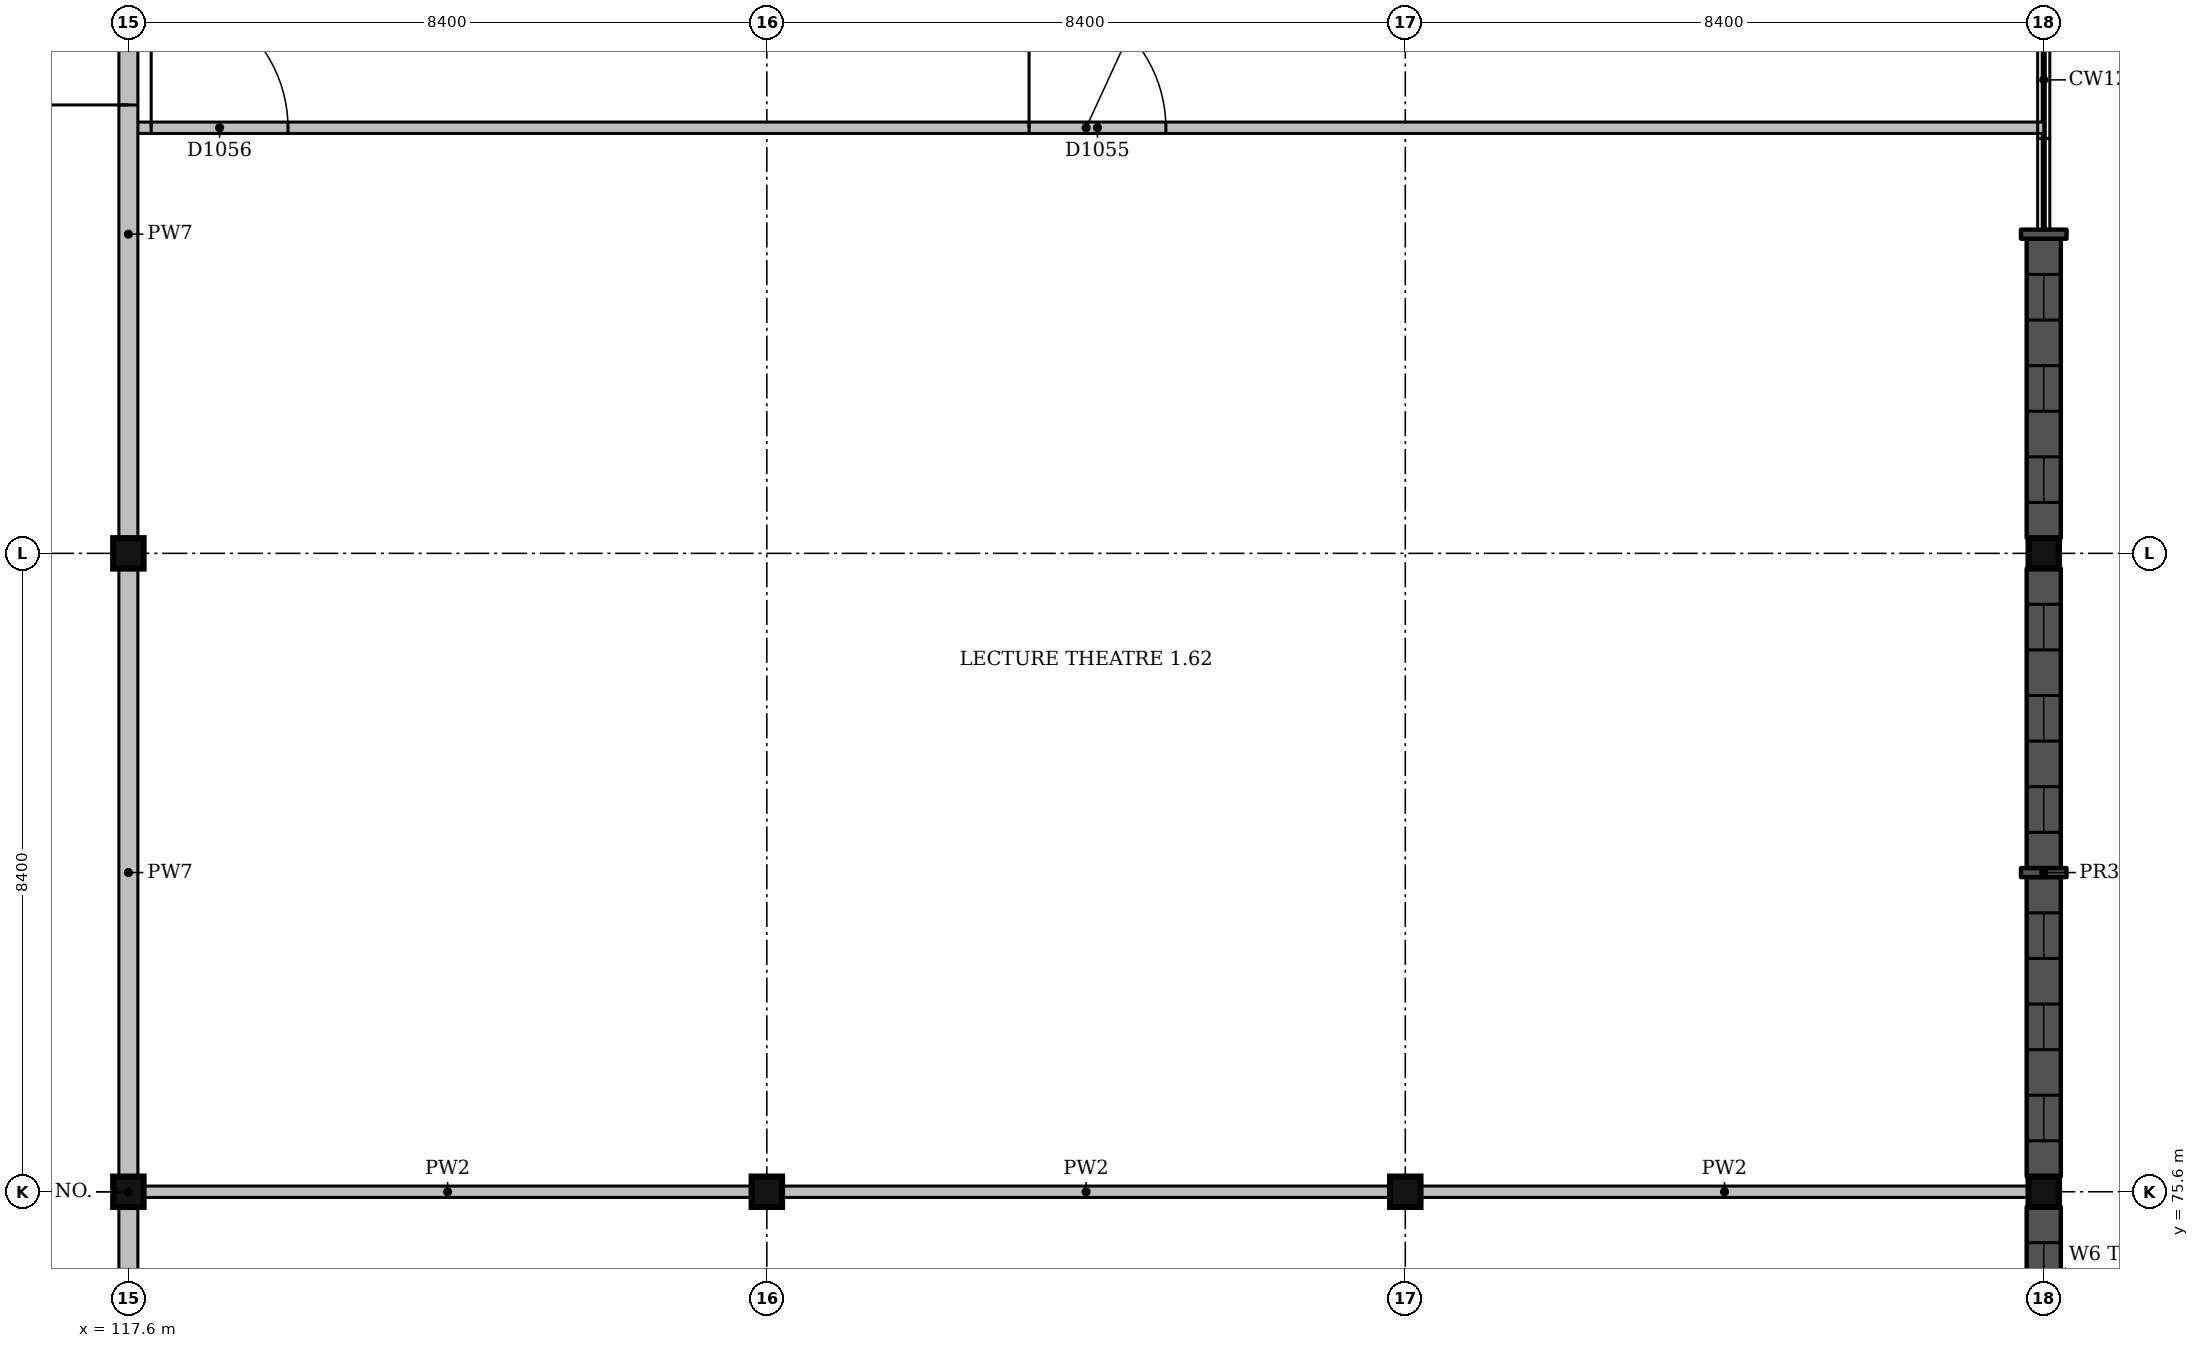
"""IFC4 building model, lengths in metres.
Left out: names, types, materials, properties, quantities, classifications, styles, units other than length and angle.
Written with IfcOpenShell. Run it as: python <this file> out.ifc"""

import sys

from ifc_helpers import new_model, si_unit, direction, frame, frame_2d, origin, origin_2d, place, context, subcontext, project, spatial, rectangle, extrude, element, fill, save


model = new_model("IFC4")
c1 = context("Model", 3, precision=1e-05, world=origin(), true_north=direction((0.0, 1.0)))
c2 = subcontext(c1, "Body", "Model", "MODEL_VIEW")
j1 = project(units=[si_unit("LENGTHUNIT", "METRE"), si_unit("PLANEANGLEUNIT", "RADIAN")], contexts=[c1])
p1 = place(None, origin())
s1 = spatial("IfcSite", under=j1, at=p1, CompositionType="ELEMENT")
p2 = place(p1, origin())
s2 = spatial("IfcBuilding", under=s1, at=p2, CompositionType="ELEMENT")
p3 = place(p2, frame((0.0, 0.0, 4.5)))
s3 = spatial("IfcBuildingStorey", under=s2, at=p3, CompositionType="ELEMENT", Elevation=4.5)
for number, where, z_axis, x_axis in (
    (1, (117.6, 75.6, -1.5), (0.0, 0.0, 1.0), (1.0, 0.0, 0.0)),
    (2, (117.6, 84.0, -1.5), (0.0, 0.0, 1.0), (1.0, 0.0, 0.0)),
    (3, (126.0, 75.6, -1.5), (0.0, 0.0, 1.0), (1.0, 0.0, 0.0)),
    (4, (134.4, 75.6, -1.5), (0.0, 0.0, 1.0), (1.0, 0.0, 0.0)),
    (5, (142.8, 75.6, -1.5), (0.0, 0.0, 1.0), (1.0, 0.0, 0.0)),
    (6, (142.8, 84.0, -1.5), (0.0, 0.0, 1.0), (1.0, 0.0, 0.0)),
):
    element("IfcColumn", number, at=place(p3, frame(where, z_axis=z_axis, x_axis=x_axis)), inside=s3, PredefinedType="COLUMN", context=c2, shape_type="SweptSolid", body=[
        extrude(rectangle(XDim=0.4, YDim=0.4, at=origin_2d()), origin(), (0.0, 0.0, 1.0), 6.0),
    ])
p4 = place(p3, frame((142.8, 71.46, 0.0), z_axis=(0.0, 0.0, 1.0), x_axis=(0.0, 1.0, 0.0)))
e7 = element("IfcWall", 7, at=p4, inside=s3, PredefinedType="SOLIDWALL", context=c2, shape_type="SweptSolid", body=[
    extrude(rectangle(XDim=3.94, YDim=0.45, at=frame_2d((1.97, 0.0))), origin(), (0.0, 0.0, 1.0), 3.65),
])
p5 = place(p4, frame((0.47, 0.0, 1.0)))
e8 = element("IfcOpeningElement", 8, at=p5, cuts=e7, PredefinedType="OPENING", context=c2, shape_type="SweptSolid", body=[
    extrude(rectangle(XDim=0.6, YDim=2.1, at=frame_2d((0.3, 1.05))), frame((0.0, 0.235, 0.0), z_axis=(0.0, -1.0, 0.0), x_axis=(1.0, 0.0, 0.0)), (0.0, 0.0, 1.0), 0.47),
])
p6 = place(p4, frame((1.67, 0.0, 1.0)))
e9 = element("IfcOpeningElement", 9, at=p6, cuts=e7, PredefinedType="OPENING", context=c2, shape_type="SweptSolid", body=[
    extrude(rectangle(XDim=0.6, YDim=2.1, at=frame_2d((0.3, 1.05))), frame((0.0, 0.235, 0.0), z_axis=(0.0, -1.0, 0.0), x_axis=(1.0, 0.0, 0.0)), (0.0, 0.0, 1.0), 0.47),
])
p7 = place(p4, frame((2.87, 0.0, 1.0)))
e10 = element("IfcOpeningElement", 10, at=p7, cuts=e7, PredefinedType="OPENING", context=c2, shape_type="SweptSolid", body=[
    extrude(rectangle(XDim=0.6, YDim=2.1, at=frame_2d((0.3, 1.05))), frame((0.0, 0.235, 0.0), z_axis=(0.0, -1.0, 0.0), x_axis=(1.0, 0.0, 0.0)), (0.0, 0.0, 1.0), 0.47),
])
p8 = place(p3, frame((142.8, 75.8, 0.0), z_axis=(0.0, 0.0, 1.0), x_axis=(0.0, 1.0, 0.0)))
e11 = element("IfcWall", 11, at=p8, inside=s3, PredefinedType="SOLIDWALL", context=c2, shape_type="SweptSolid", body=[
    extrude(rectangle(XDim=3.94, YDim=0.45, at=frame_2d((1.97, 0.0))), origin(), (0.0, 0.0, 1.0), 3.65),
])
p9 = place(p8, frame((0.47, 0.0, 1.0)))
e12 = element("IfcOpeningElement", 12, at=p9, cuts=e11, PredefinedType="OPENING", context=c2, shape_type="SweptSolid", body=[
    extrude(rectangle(XDim=0.6, YDim=2.1, at=frame_2d((0.3, 1.05))), frame((0.0, 0.235, 0.0), z_axis=(0.0, -1.0, 0.0), x_axis=(1.0, 0.0, 0.0)), (0.0, 0.0, 1.0), 0.47),
])
p10 = place(p8, frame((1.67, 0.0, 1.0)))
e13 = element("IfcOpeningElement", 13, at=p10, cuts=e11, PredefinedType="OPENING", context=c2, shape_type="SweptSolid", body=[
    extrude(rectangle(XDim=0.6, YDim=2.1, at=frame_2d((0.3, 1.05))), frame((0.0, 0.235, 0.0), z_axis=(0.0, -1.0, 0.0), x_axis=(1.0, 0.0, 0.0)), (0.0, 0.0, 1.0), 0.47),
])
p11 = place(p8, frame((2.87, 0.0, 1.0)))
e14 = element("IfcOpeningElement", 14, at=p11, cuts=e11, PredefinedType="OPENING", context=c2, shape_type="SweptSolid", body=[
    extrude(rectangle(XDim=0.6, YDim=2.1, at=frame_2d((0.3, 1.05))), frame((0.0, 0.235, 0.0), z_axis=(0.0, -1.0, 0.0), x_axis=(1.0, 0.0, 0.0)), (0.0, 0.0, 1.0), 0.47),
])
p12 = place(p3, frame((142.8, 79.74, 0.0), z_axis=(0.0, 0.0, 1.0), x_axis=(0.0, 1.0, 0.0)))
e15 = element("IfcWall", 15, at=p12, inside=s3, PredefinedType="SOLIDWALL", context=c2, shape_type="SweptSolid", body=[
    extrude(rectangle(XDim=0.12, YDim=0.6, at=frame_2d((0.06, 0.0))), origin(), (0.0, 0.0, 1.0), 3.65),
])
p13 = place(p3, frame((142.8, 79.86, 0.0), z_axis=(0.0, 0.0, 1.0), x_axis=(0.0, 1.0, 0.0)))
e16 = element("IfcWall", 16, at=p13, inside=s3, PredefinedType="SOLIDWALL", context=c2, shape_type="SweptSolid", body=[
    extrude(rectangle(XDim=3.94, YDim=0.45, at=frame_2d((1.97, 0.0))), origin(), (0.0, 0.0, 1.0), 3.65),
])
p14 = place(p13, frame((0.47, 0.0, 1.0)))
e17 = element("IfcOpeningElement", 17, at=p14, cuts=e16, PredefinedType="OPENING", context=c2, shape_type="SweptSolid", body=[
    extrude(rectangle(XDim=0.6, YDim=2.1, at=frame_2d((0.3, 1.05))), frame((0.0, 0.235, 0.0), z_axis=(0.0, -1.0, 0.0), x_axis=(1.0, 0.0, 0.0)), (0.0, 0.0, 1.0), 0.47),
])
p15 = place(p13, frame((1.67, 0.0, 1.0)))
e18 = element("IfcOpeningElement", 18, at=p15, cuts=e16, PredefinedType="OPENING", context=c2, shape_type="SweptSolid", body=[
    extrude(rectangle(XDim=0.6, YDim=2.1, at=frame_2d((0.3, 1.05))), frame((0.0, 0.235, 0.0), z_axis=(0.0, -1.0, 0.0), x_axis=(1.0, 0.0, 0.0)), (0.0, 0.0, 1.0), 0.47),
])
p16 = place(p13, frame((2.87, 0.0, 1.0)))
e19 = element("IfcOpeningElement", 19, at=p16, cuts=e16, PredefinedType="OPENING", context=c2, shape_type="SweptSolid", body=[
    extrude(rectangle(XDim=0.6, YDim=2.1, at=frame_2d((0.3, 1.05))), frame((0.0, 0.235, 0.0), z_axis=(0.0, -1.0, 0.0), x_axis=(1.0, 0.0, 0.0)), (0.0, 0.0, 1.0), 0.47),
])
p17 = place(p3, frame((142.8, 84.2, 0.0), z_axis=(0.0, 0.0, 1.0), x_axis=(0.0, 1.0, 0.0)))
e20 = element("IfcWall", 20, at=p17, inside=s3, PredefinedType="SOLIDWALL", context=c2, shape_type="SweptSolid", body=[
    extrude(rectangle(XDim=3.94, YDim=0.45, at=frame_2d((1.97, 0.0))), origin(), (0.0, 0.0, 1.0), 3.65),
])
p18 = place(p17, frame((0.47, 0.0, 1.0)))
e21 = element("IfcOpeningElement", 21, at=p18, cuts=e20, PredefinedType="OPENING", context=c2, shape_type="SweptSolid", body=[
    extrude(rectangle(XDim=0.6, YDim=2.1, at=frame_2d((0.3, 1.05))), frame((0.0, 0.235, 0.0), z_axis=(0.0, -1.0, 0.0), x_axis=(1.0, 0.0, 0.0)), (0.0, 0.0, 1.0), 0.47),
])
p19 = place(p17, frame((1.67, 0.0, 1.0)))
e22 = element("IfcOpeningElement", 22, at=p19, cuts=e20, PredefinedType="OPENING", context=c2, shape_type="SweptSolid", body=[
    extrude(rectangle(XDim=0.6, YDim=2.1, at=frame_2d((0.3, 1.05))), frame((0.0, 0.235, 0.0), z_axis=(0.0, -1.0, 0.0), x_axis=(1.0, 0.0, 0.0)), (0.0, 0.0, 1.0), 0.47),
])
p20 = place(p17, frame((2.87, 0.0, 1.0)))
e23 = element("IfcOpeningElement", 23, at=p20, cuts=e20, PredefinedType="OPENING", context=c2, shape_type="SweptSolid", body=[
    extrude(rectangle(XDim=0.6, YDim=2.1, at=frame_2d((0.3, 1.05))), frame((0.0, 0.235, 0.0), z_axis=(0.0, -1.0, 0.0), x_axis=(1.0, 0.0, 0.0)), (0.0, 0.0, 1.0), 0.47),
])
p21 = place(p3, frame((142.8, 88.14, 0.0), z_axis=(0.0, 0.0, 1.0), x_axis=(0.0, 1.0, 0.0)))
e24 = element("IfcWall", 24, at=p21, inside=s3, PredefinedType="SOLIDWALL", context=c2, shape_type="SweptSolid", body=[
    extrude(rectangle(XDim=0.12, YDim=0.6, at=frame_2d((0.06, 0.0))), origin(), (0.0, 0.0, 1.0), 3.65),
])
for number, where, z_axis, x_axis in (
    (25, (117.8, 75.6, 0.0), (0.0, 0.0, 1.0), (1.0, 0.0, 0.0)),
    (26, (126.2, 75.6, 0.0), (0.0, 0.0, 1.0), (1.0, 0.0, 0.0)),
    (27, (134.6, 75.6, 0.0), (0.0, 0.0, 1.0), (1.0, 0.0, 0.0)),
):
    element("IfcWall", number, at=place(p3, frame(where, z_axis=z_axis, x_axis=x_axis)), inside=s3, PredefinedType="PARTITIONING", context=c2, shape_type="SweptSolid", body=[
        extrude(rectangle(XDim=8.0, YDim=0.15, at=frame_2d((4.0, 0.0))), origin(), (0.0, 0.0, 1.0), 4.15),
    ])
p22 = place(p3, frame((117.6, 89.6, 0.0), z_axis=(0.0, 0.0, 1.0), x_axis=(1.0, 0.0, 0.0)))
e28 = element("IfcWall", 28, at=p22, inside=s3, PredefinedType="PARTITIONING", context=c2, shape_type="SweptSolid", body=[
    extrude(rectangle(XDim=25.2, YDim=0.15, at=frame_2d((12.6, 0.0))), origin(), (0.0, 0.0, 1.0), 2.37),
])
p23 = place(p22, frame((11.85, 0.0, 0.0)))
e29 = element("IfcOpeningElement", 29, at=p23, cuts=e28, PredefinedType="OPENING", context=c2, shape_type="SweptSolid", body=[
    extrude(rectangle(XDim=1.8, YDim=2.1, at=frame_2d((0.9, 1.05))), frame((0.0, 0.085, 0.0), z_axis=(0.0, -1.0, 0.0), x_axis=(1.0, 0.0, 0.0)), (0.0, 0.0, 1.0), 0.17),
])
p24 = place(p22, frame((0.3, 0.0, 0.0)))
e30 = element("IfcOpeningElement", 30, at=p24, cuts=e28, PredefinedType="OPENING", context=c2, shape_type="SweptSolid", body=[
    extrude(rectangle(XDim=1.8, YDim=2.1, at=frame_2d((0.9, 1.05))), frame((0.0, 0.085, 0.0), z_axis=(0.0, -1.0, 0.0), x_axis=(1.0, 0.0, 0.0)), (0.0, 0.0, 1.0), 0.17),
])
p25 = place(p3, frame((117.6, 67.4, 0.0), z_axis=(0.0, 0.0, 1.0), x_axis=(0.0, 1.0, 0.0)))
e31 = element("IfcWall", 31, at=p25, inside=s3, PredefinedType="SOLIDWALL", context=c2, shape_type="SweptSolid", body=[
    extrude(rectangle(XDim=8.0, YDim=0.25, at=frame_2d((4.0, 0.0))), origin(), (0.0, 0.0, 1.0), 3.65),
])
p26 = place(p25, frame((3.1, 0.0, 0.0)))
e32 = element("IfcOpeningElement", 32, at=p26, cuts=e31, PredefinedType="OPENING", context=c2, shape_type="SweptSolid", body=[
    extrude(rectangle(XDim=1.8, YDim=2.1, at=frame_2d((0.9, 1.05))), frame((0.0, 0.135, 0.0), z_axis=(0.0, -1.0, 0.0), x_axis=(1.0, 0.0, 0.0)), (0.0, 0.0, 1.0), 0.27),
])
p27 = place(p3, frame((117.6, 75.8, 0.0), z_axis=(0.0, 0.0, 1.0), x_axis=(0.0, 1.0, 0.0)))
e33 = element("IfcWall", 33, at=p27, inside=s3, PredefinedType="SOLIDWALL", context=c2, shape_type="SweptSolid", body=[
    extrude(rectangle(XDim=8.0, YDim=0.25, at=frame_2d((4.0, 0.0))), origin(), (0.0, 0.0, 1.0), 3.65),
])
p28 = place(p3, frame((117.6, 84.2, 0.0), z_axis=(0.0, 0.0, 1.0), x_axis=(0.0, 1.0, 0.0)))
e34 = element("IfcWall", 34, at=p28, inside=s3, PredefinedType="SOLIDWALL", context=c2, shape_type="SweptSolid", body=[
    extrude(rectangle(XDim=8.0, YDim=0.25, at=frame_2d((4.0, 0.0))), origin(), (0.0, 0.0, 1.0), 3.65),
])
p29 = place(p28, frame((5.7, 0.0, 0.0)))
e35 = element("IfcOpeningElement", 35, at=p29, cuts=e34, PredefinedType="OPENING", context=c2, shape_type="SweptSolid", body=[
    extrude(rectangle(XDim=1.8, YDim=2.1, at=frame_2d((0.9, 1.05))), frame((0.0, 0.135, 0.0), z_axis=(0.0, -1.0, 0.0), x_axis=(1.0, 0.0, 0.0)), (0.0, 0.0, 1.0), 0.27),
])
p30 = place(p7, origin())
e36 = element("IfcWindow", 36, at=p30, inside=s3, PartitioningType="SINGLE_PANEL", PredefinedType="WINDOW", context=c2, shape_type="SweptSolid", body=[
    extrude(rectangle(XDim=0.6, YDim=2.1, at=frame_2d((0.3, 1.05))), frame((0.0, 0.135, 0.0), z_axis=(0.0, -1.0, 0.0), x_axis=(1.0, 0.0, 0.0)), (0.0, 0.0, 1.0), 0.06),
])
fill(e10, e36)
p31 = place(p9, origin())
e37 = element("IfcWindow", 37, at=p31, inside=s3, PartitioningType="SINGLE_PANEL", PredefinedType="WINDOW", context=c2, shape_type="SweptSolid", body=[
    extrude(rectangle(XDim=0.6, YDim=2.1, at=frame_2d((0.3, 1.05))), frame((0.0, 0.135, 0.0), z_axis=(0.0, -1.0, 0.0), x_axis=(1.0, 0.0, 0.0)), (0.0, 0.0, 1.0), 0.06),
])
fill(e12, e37)
p32 = place(p10, origin())
e38 = element("IfcWindow", 38, at=p32, inside=s3, PartitioningType="SINGLE_PANEL", PredefinedType="WINDOW", context=c2, shape_type="SweptSolid", body=[
    extrude(rectangle(XDim=0.6, YDim=2.1, at=frame_2d((0.3, 1.05))), frame((0.0, 0.135, 0.0), z_axis=(0.0, -1.0, 0.0), x_axis=(1.0, 0.0, 0.0)), (0.0, 0.0, 1.0), 0.06),
])
fill(e13, e38)
p33 = place(p11, origin())
e39 = element("IfcWindow", 39, at=p33, inside=s3, PartitioningType="SINGLE_PANEL", PredefinedType="WINDOW", context=c2, shape_type="SweptSolid", body=[
    extrude(rectangle(XDim=0.6, YDim=2.1, at=frame_2d((0.3, 1.05))), frame((0.0, 0.135, 0.0), z_axis=(0.0, -1.0, 0.0), x_axis=(1.0, 0.0, 0.0)), (0.0, 0.0, 1.0), 0.06),
])
fill(e14, e39)
p34 = place(p14, origin())
e40 = element("IfcWindow", 40, at=p34, inside=s3, PartitioningType="SINGLE_PANEL", PredefinedType="WINDOW", context=c2, shape_type="SweptSolid", body=[
    extrude(rectangle(XDim=0.6, YDim=2.1, at=frame_2d((0.3, 1.05))), frame((0.0, 0.135, 0.0), z_axis=(0.0, -1.0, 0.0), x_axis=(1.0, 0.0, 0.0)), (0.0, 0.0, 1.0), 0.06),
])
fill(e17, e40)
p35 = place(p15, origin())
e41 = element("IfcWindow", 41, at=p35, inside=s3, PartitioningType="SINGLE_PANEL", PredefinedType="WINDOW", context=c2, shape_type="SweptSolid", body=[
    extrude(rectangle(XDim=0.6, YDim=2.1, at=frame_2d((0.3, 1.05))), frame((0.0, 0.135, 0.0), z_axis=(0.0, -1.0, 0.0), x_axis=(1.0, 0.0, 0.0)), (0.0, 0.0, 1.0), 0.06),
])
fill(e18, e41)
p36 = place(p16, origin())
e42 = element("IfcWindow", 42, at=p36, inside=s3, PartitioningType="SINGLE_PANEL", PredefinedType="WINDOW", context=c2, shape_type="SweptSolid", body=[
    extrude(rectangle(XDim=0.6, YDim=2.1, at=frame_2d((0.3, 1.05))), frame((0.0, 0.135, 0.0), z_axis=(0.0, -1.0, 0.0), x_axis=(1.0, 0.0, 0.0)), (0.0, 0.0, 1.0), 0.06),
])
fill(e19, e42)
p37 = place(p18, origin())
e43 = element("IfcWindow", 43, at=p37, inside=s3, PartitioningType="SINGLE_PANEL", PredefinedType="WINDOW", context=c2, shape_type="SweptSolid", body=[
    extrude(rectangle(XDim=0.6, YDim=2.1, at=frame_2d((0.3, 1.05))), frame((0.0, 0.135, 0.0), z_axis=(0.0, -1.0, 0.0), x_axis=(1.0, 0.0, 0.0)), (0.0, 0.0, 1.0), 0.06),
])
fill(e21, e43)
p38 = place(p19, origin())
e44 = element("IfcWindow", 44, at=p38, inside=s3, PartitioningType="SINGLE_PANEL", PredefinedType="WINDOW", context=c2, shape_type="SweptSolid", body=[
    extrude(rectangle(XDim=0.6, YDim=2.1, at=frame_2d((0.3, 1.05))), frame((0.0, 0.135, 0.0), z_axis=(0.0, -1.0, 0.0), x_axis=(1.0, 0.0, 0.0)), (0.0, 0.0, 1.0), 0.06),
])
fill(e22, e44)
p39 = place(p20, origin())
e45 = element("IfcWindow", 45, at=p39, inside=s3, PartitioningType="SINGLE_PANEL", PredefinedType="WINDOW", context=c2, shape_type="SweptSolid", body=[
    extrude(rectangle(XDim=0.6, YDim=2.1, at=frame_2d((0.3, 1.05))), frame((0.0, 0.135, 0.0), z_axis=(0.0, -1.0, 0.0), x_axis=(1.0, 0.0, 0.0)), (0.0, 0.0, 1.0), 0.06),
])
fill(e23, e45)
p40 = place(p23, origin())
e46 = element("IfcDoor", 46, at=p40, inside=s3, OperationType="DOUBLE_DOOR_SINGLE_SWING", PredefinedType="DOOR", context=c2, shape_type="SweptSolid", body=[
    extrude(rectangle(XDim=1.8, YDim=2.1, at=frame_2d((0.9, 1.05))), frame((0.0, 0.025, 0.0), z_axis=(0.0, -1.0, 0.0), x_axis=(1.0, 0.0, 0.0)), (0.0, 0.0, 1.0), 0.05),
])
fill(e29, e46)
p41 = place(p24, origin())
e47 = element("IfcDoor", 47, at=p41, inside=s3, OperationType="DOUBLE_DOOR_SINGLE_SWING", PredefinedType="DOOR", context=c2, shape_type="SweptSolid", body=[
    extrude(rectangle(XDim=1.8, YDim=2.1, at=frame_2d((0.9, 1.05))), frame((0.0, 0.025, 0.0), z_axis=(0.0, -1.0, 0.0), x_axis=(1.0, 0.0, 0.0)), (0.0, 0.0, 1.0), 0.05),
])
fill(e30, e47)
p42 = place(p29, origin())
e48 = element("IfcDoor", 48, at=p42, inside=s3, OperationType="DOUBLE_DOOR_SINGLE_SWING", PredefinedType="DOOR", context=c2, shape_type="SweptSolid", body=[
    extrude(rectangle(XDim=1.8, YDim=2.1, at=frame_2d((0.9, 1.05))), frame((0.0, 0.025, 0.0), z_axis=(0.0, -1.0, 0.0), x_axis=(1.0, 0.0, 0.0)), (0.0, 0.0, 1.0), 0.05),
])
fill(e35, e48)
save(model, sys.argv[1])
